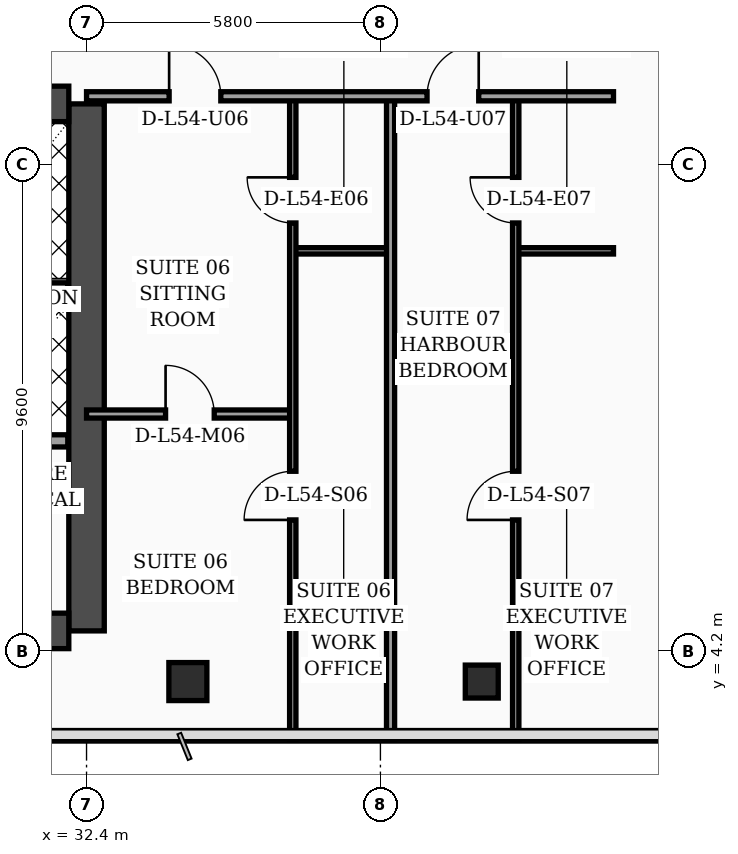
"""IFC4 building model, lengths in metres.
Left out: names, types, materials, properties, quantities, classifications, styles, units other than length and angle.
Written with IfcOpenShell. Run it as: python <this file> out.ifc"""

import sys

from ifc_helpers import new_model, si_unit, direction, frame, frame_2d, origin, origin_2d, place, context, subcontext, project, spatial, rectangle, hollow_rectangle, extrude, element, fill, save


model = new_model("IFC4")
c1 = context("Model", 3, precision=1e-05, world=origin(), true_north=direction((0.0, 1.0)))
c2 = subcontext(c1, "Body", "Model", "MODEL_VIEW")
j1 = project(units=[si_unit("LENGTHUNIT", "METRE"), si_unit("PLANEANGLEUNIT", "RADIAN")], contexts=[c1])
p1 = place(None, origin())
s1 = spatial("IfcSite", under=j1, at=p1, CompositionType="ELEMENT")
p2 = place(p1, origin())
s2 = spatial("IfcBuilding", under=s1, at=p2, CompositionType="ELEMENT")
p3 = place(p2, frame((0.0, 0.0, 219.3)))
s3 = spatial("IfcBuildingStorey", under=s2, at=p3, CompositionType="ELEMENT", Elevation=219.3)
p4 = place(p3, frame((32.4, 4.6, 0.0), z_axis=(0.0, 0.0, 1.0), x_axis=(0.0, 1.0, 0.0)))
e1 = element("IfcWall", 1, at=p4, inside=s3, PredefinedType="SHEAR", context=c2, shape_type="SweptSolid", body=[
    extrude(rectangle(XDim=10.4, YDim=0.7, at=frame_2d((5.2, 0.0))), origin(), (0.0, 0.0, 1.0), 3.56),
])
p5 = place(p3, frame((21.95, 15.0, 0.0), z_axis=(0.0, 0.0, 1.0), x_axis=(1.0, 0.0, 0.0)))
e2 = element("IfcWall", 2, at=p5, inside=s3, PredefinedType="SHEAR", context=c2, shape_type="SweptSolid", body=[
    extrude(rectangle(XDim=10.1, YDim=0.7, at=frame_2d((5.05, 0.0))), origin(), (0.0, 0.0, 1.0), 3.56),
])
p6 = place(p5, frame((4.95, 0.0, 0.0)))
e3 = element("IfcOpeningElement", 3, at=p6, cuts=e2, PredefinedType="OPENING", context=c2, shape_type="SweptSolid", body=[
    extrude(rectangle(XDim=1.1, YDim=2.2, at=frame_2d((0.55, 1.1))), frame((0.0, 0.36, 0.0), z_axis=(0.0, -1.0, 0.0), x_axis=(1.0, 0.0, 0.0)), (0.0, 0.0, 1.0), 0.72),
])
p7 = place(p3, frame((21.95, 4.6, 0.0), z_axis=(0.0, 0.0, 1.0), x_axis=(1.0, 0.0, 0.0)))
e4 = element("IfcWall", 4, at=p7, inside=s3, PredefinedType="SHEAR", context=c2, shape_type="SweptSolid", body=[
    extrude(rectangle(XDim=10.1, YDim=0.7, at=frame_2d((5.05, 0.0))), origin(), (0.0, 0.0, 1.0), 3.56),
])
p8 = place(p3, frame((34.4, 3.6, 0.0), z_axis=(0.0, 0.0, 1.0), x_axis=(1.0, 0.0, 0.0)))
e5 = element("IfcColumn", 5, at=p8, inside=s3, PredefinedType="COLUMN", context=c2, shape_type="SweptSolid", body=[
    extrude(hollow_rectangle(XDim=0.75, YDim=0.75, WallThickness=0.032, at=origin_2d()), origin(), (0.0, 0.0, 1.0), 3.56),
])
p9 = place(p3, frame((40.2, 3.6, 0.0), z_axis=(0.0, 0.0, 1.0), x_axis=(1.0, 0.0, 0.0)))
e6 = element("IfcColumn", 6, at=p9, inside=s3, PredefinedType="COLUMN", context=c2, shape_type="SweptSolid", body=[
    extrude(hollow_rectangle(XDim=0.65, YDim=0.65, WallThickness=0.028, at=origin_2d()), origin(), (0.0, 0.0, 1.0), 3.56),
])
p10 = place(p3, frame((49.43, 5.505, 0.0), z_axis=(0.0, 0.0, 1.0), x_axis=(-0.300509063924, 0.953778958931, 0.0)))
e7 = element("IfcWall", 7, at=p10, inside=s3, PredefinedType="SOLIDWALL", context=c2, shape_type="SweptSolid", body=[
    extrude(rectangle(XDim=30.814, YDim=0.32, at=frame_2d((15.407, 0.0))), origin(), (0.0, 0.0, 1.0), 3.56),
])
p11 = place(p10, frame((8.9, 0.0, 0.0)))
e8 = element("IfcOpeningElement", 8, at=p11, cuts=e7, PredefinedType="OPENING", context=c2, shape_type="SweptSolid", body=[
    extrude(rectangle(XDim=1.4, YDim=2.25, at=frame_2d((0.7, 1.125))), frame((0.0, 0.17, 0.0), z_axis=(0.0, -1.0, 0.0), x_axis=(1.0, 0.0, 0.0)), (0.0, 0.0, 1.0), 0.34),
])
p12 = place(p10, frame((4.437, 0.0, 0.7)))
e9 = element("IfcOpeningElement", 9, at=p12, cuts=e7, PredefinedType="OPENING", context=c2, shape_type="SweptSolid", body=[
    extrude(rectangle(XDim=1.6, YDim=1.65, at=frame_2d((0.8, 0.825))), frame((0.0, 0.17, 0.0), z_axis=(0.0, -1.0, 0.0), x_axis=(1.0, 0.0, 0.0)), (0.0, 0.0, 1.0), 0.34),
])
p13 = place(p10, frame((18.696, 0.0, 0.7)))
e10 = element("IfcOpeningElement", 10, at=p13, cuts=e7, PredefinedType="OPENING", context=c2, shape_type="SweptSolid", body=[
    extrude(rectangle(XDim=1.6, YDim=1.65, at=frame_2d((0.8, 0.825))), frame((0.0, 0.17, 0.0), z_axis=(0.0, -1.0, 0.0), x_axis=(1.0, 0.0, 0.0)), (0.0, 0.0, 1.0), 0.34),
])
p14 = place(p10, frame((1.6, 0.0, 0.75)))
e11 = element("IfcOpeningElement", 11, at=p14, cuts=e7, PredefinedType="OPENING", context=c2, shape_type="SweptSolid", body=[
    extrude(rectangle(XDim=1.5, YDim=1.6, at=frame_2d((0.75, 0.8))), frame((0.0, 0.17, 0.0), z_axis=(0.0, -1.0, 0.0), x_axis=(1.0, 0.0, 0.0)), (0.0, 0.0, 1.0), 0.34),
])
p15 = place(p10, frame((6.75, 0.0, 0.75)))
e12 = element("IfcOpeningElement", 12, at=p15, cuts=e7, PredefinedType="OPENING", context=c2, shape_type="SweptSolid", body=[
    extrude(rectangle(XDim=1.5, YDim=1.6, at=frame_2d((0.75, 0.8))), frame((0.0, 0.17, 0.0), z_axis=(0.0, -1.0, 0.0), x_axis=(1.0, 0.0, 0.0)), (0.0, 0.0, 1.0), 0.34),
])
p16 = place(p10, frame((10.9, 0.0, 0.75)))
e13 = element("IfcOpeningElement", 13, at=p16, cuts=e7, PredefinedType="OPENING", context=c2, shape_type="SweptSolid", body=[
    extrude(rectangle(XDim=1.5, YDim=1.6, at=frame_2d((0.75, 0.8))), frame((0.0, 0.17, 0.0), z_axis=(0.0, -1.0, 0.0), x_axis=(1.0, 0.0, 0.0)), (0.0, 0.0, 1.0), 0.34),
])
p17 = place(p10, frame((14.0, 0.0, 0.75)))
e14 = element("IfcOpeningElement", 14, at=p17, cuts=e7, PredefinedType="OPENING", context=c2, shape_type="SweptSolid", body=[
    extrude(rectangle(XDim=1.5, YDim=1.6, at=frame_2d((0.75, 0.8))), frame((0.0, 0.17, 0.0), z_axis=(0.0, -1.0, 0.0), x_axis=(1.0, 0.0, 0.0)), (0.0, 0.0, 1.0), 0.34),
])
p18 = place(p10, frame((16.55, 0.0, 0.75)))
e15 = element("IfcOpeningElement", 15, at=p18, cuts=e7, PredefinedType="OPENING", context=c2, shape_type="SweptSolid", body=[
    extrude(rectangle(XDim=1.5, YDim=1.6, at=frame_2d((0.75, 0.8))), frame((0.0, 0.17, 0.0), z_axis=(0.0, -1.0, 0.0), x_axis=(1.0, 0.0, 0.0)), (0.0, 0.0, 1.0), 0.34),
])
p19 = place(p10, frame((20.75, 0.0, 0.75)))
e16 = element("IfcOpeningElement", 16, at=p19, cuts=e7, PredefinedType="OPENING", context=c2, shape_type="SweptSolid", body=[
    extrude(rectangle(XDim=1.5, YDim=1.6, at=frame_2d((0.75, 0.8))), frame((0.0, 0.17, 0.0), z_axis=(0.0, -1.0, 0.0), x_axis=(1.0, 0.0, 0.0)), (0.0, 0.0, 1.0), 0.34),
])
p20 = place(p10, frame((23.3, 0.0, 0.75)))
e17 = element("IfcOpeningElement", 17, at=p20, cuts=e7, PredefinedType="OPENING", context=c2, shape_type="SweptSolid", body=[
    extrude(rectangle(XDim=1.5, YDim=1.6, at=frame_2d((0.75, 0.8))), frame((0.0, 0.17, 0.0), z_axis=(0.0, -1.0, 0.0), x_axis=(1.0, 0.0, 0.0)), (0.0, 0.0, 1.0), 0.34),
])
p21 = place(p10, frame((26.4, 0.0, 0.75)))
e18 = element("IfcOpeningElement", 18, at=p21, cuts=e7, PredefinedType="OPENING", context=c2, shape_type="SweptSolid", body=[
    extrude(rectangle(XDim=1.5, YDim=1.6, at=frame_2d((0.75, 0.8))), frame((0.0, 0.17, 0.0), z_axis=(0.0, -1.0, 0.0), x_axis=(1.0, 0.0, 0.0)), (0.0, 0.0, 1.0), 0.34),
])
p22 = place(p3, frame((27.02, 11.35, 0.0), z_axis=(0.0, 0.0, 1.0), x_axis=(1.0, 0.0, 0.0)))
e19 = element("IfcWall", 19, at=p22, inside=s3, PredefinedType="SOLIDWALL", context=c2, shape_type="SweptSolid", body=[
    extrude(rectangle(XDim=5.01, YDim=0.24, at=frame_2d((2.505, 0.0))), origin(), (0.0, 0.0, 1.0), 3.56),
])
p23 = place(p22, frame((0.45, 0.0, 0.0)))
e20 = element("IfcOpeningElement", 20, at=p23, cuts=e19, PredefinedType="OPENING", context=c2, shape_type="SweptSolid", body=[
    extrude(rectangle(XDim=1.3, YDim=2.35, at=frame_2d((0.65, 1.175))), frame((0.0, 0.13, 0.0), z_axis=(0.0, -1.0, 0.0), x_axis=(1.0, 0.0, 0.0)), (0.0, 0.0, 1.0), 0.26),
])
p24 = place(p3, frame((27.02, 8.35, 0.0), z_axis=(0.0, 0.0, 1.0), x_axis=(1.0, 0.0, 0.0)))
e21 = element("IfcWall", 21, at=p24, inside=s3, PredefinedType="SOLIDWALL", context=c2, shape_type="SweptSolid", body=[
    extrude(rectangle(XDim=5.01, YDim=0.24, at=frame_2d((2.505, 0.0))), origin(), (0.0, 0.0, 1.0), 3.56),
])
p25 = place(p3, frame((36.47, 12.1, 0.0), z_axis=(0.0, 0.0, 1.0), x_axis=(1.0, 0.0, 0.0)))
e22 = element("IfcWall", 22, at=p25, inside=s3, PredefinedType="PARTITIONING", context=c2, shape_type="SweptSolid", body=[
    extrude(rectangle(XDim=1.93, YDim=0.125, at=frame_2d((0.965, 0.0))), origin(), (0.0, 0.0, 1.0), 3.56),
])
p26 = place(p3, frame((32.4, 8.88, 0.0), z_axis=(0.0, 0.0, 1.0), x_axis=(1.0, 0.0, 0.0)))
e23 = element("IfcWall", 23, at=p26, inside=s3, PredefinedType="PARTITIONING", context=c2, shape_type="SweptSolid", body=[
    extrude(rectangle(XDim=4.07, YDim=0.16, at=frame_2d((2.035, 0.0))), origin(), (0.0, 0.0, 1.0), 2.94),
])
p27 = place(p26, frame((1.56, 0.0, 0.0)))
e24 = element("IfcOpeningElement", 24, at=p27, cuts=e23, PredefinedType="OPENING", context=c2, shape_type="SweptSolid", body=[
    extrude(rectangle(XDim=0.96, YDim=2.2, at=frame_2d((0.48, 1.1))), frame((0.0, 0.09, 0.0), z_axis=(0.0, -1.0, 0.0), x_axis=(1.0, 0.0, 0.0)), (0.0, 0.0, 1.0), 0.18),
])
p28 = place(p3, frame((36.47, 2.44, 0.0), z_axis=(0.0, 0.0, 1.0), x_axis=(0.0, 1.0, 0.0)))
e25 = element("IfcWall", 25, at=p28, inside=s3, PredefinedType="PARTITIONING", context=c2, shape_type="SweptSolid", body=[
    extrude(rectangle(XDim=12.71, YDim=0.125, at=frame_2d((6.355, 0.0))), origin(), (0.0, 0.0, 1.0), 2.94),
])
p29 = place(p28, frame((4.35, 0.0, 0.0)))
e26 = element("IfcOpeningElement", 26, at=p29, cuts=e25, PredefinedType="OPENING", context=c2, shape_type="SweptSolid", body=[
    extrude(rectangle(XDim=0.96, YDim=2.2, at=frame_2d((0.48, 1.1))), frame((0.0, 0.073, 0.0), z_axis=(0.0, -1.0, 0.0), x_axis=(1.0, 0.0, 0.0)), (0.0, 0.0, 1.0), 0.145),
])
p30 = place(p28, frame((10.21, 0.0, 0.0)))
e27 = element("IfcOpeningElement", 27, at=p30, cuts=e25, PredefinedType="OPENING", context=c2, shape_type="SweptSolid", body=[
    extrude(rectangle(XDim=0.9, YDim=2.15, at=frame_2d((0.45, 1.075))), frame((0.0, 0.073, 0.0), z_axis=(0.0, -1.0, 0.0), x_axis=(1.0, 0.0, 0.0)), (0.0, 0.0, 1.0), 0.145),
])
p31 = place(p3, frame((40.87, 12.1, 0.0), z_axis=(0.0, 0.0, 1.0), x_axis=(1.0, 0.0, 0.0)))
e28 = element("IfcWall", 28, at=p31, inside=s3, PredefinedType="PARTITIONING", context=c2, shape_type="SweptSolid", body=[
    extrude(rectangle(XDim=1.93, YDim=0.125, at=frame_2d((0.965, 0.0))), origin(), (0.0, 0.0, 1.0), 3.56),
])
p32 = place(p3, frame((40.87, 2.44, 0.0), z_axis=(0.0, 0.0, 1.0), x_axis=(0.0, 1.0, 0.0)))
e29 = element("IfcWall", 29, at=p32, inside=s3, PredefinedType="PARTITIONING", context=c2, shape_type="SweptSolid", body=[
    extrude(rectangle(XDim=12.71, YDim=0.125, at=frame_2d((6.355, 0.0))), origin(), (0.0, 0.0, 1.0), 2.94),
])
p33 = place(p32, frame((4.35, 0.0, 0.0)))
e30 = element("IfcOpeningElement", 30, at=p33, cuts=e29, PredefinedType="OPENING", context=c2, shape_type="SweptSolid", body=[
    extrude(rectangle(XDim=0.96, YDim=2.2, at=frame_2d((0.48, 1.1))), frame((0.0, 0.073, 0.0), z_axis=(0.0, -1.0, 0.0), x_axis=(1.0, 0.0, 0.0)), (0.0, 0.0, 1.0), 0.145),
])
p34 = place(p32, frame((10.21, 0.0, 0.0)))
e31 = element("IfcOpeningElement", 31, at=p34, cuts=e29, PredefinedType="OPENING", context=c2, shape_type="SweptSolid", body=[
    extrude(rectangle(XDim=0.9, YDim=2.15, at=frame_2d((0.45, 1.075))), frame((0.0, 0.073, 0.0), z_axis=(0.0, -1.0, 0.0), x_axis=(1.0, 0.0, 0.0)), (0.0, 0.0, 1.0), 0.145),
])
p35 = place(p3, frame((38.4, 2.44, 0.0), z_axis=(0.0, 0.0, 1.0), x_axis=(0.0, 1.0, 0.0)))
e32 = element("IfcWall", 32, at=p35, inside=s3, PredefinedType="PARTITIONING", context=c2, shape_type="SweptSolid", body=[
    extrude(rectangle(XDim=12.71, YDim=0.16, at=frame_2d((6.355, 0.0))), origin(), (0.0, 0.0, 1.0), 2.94),
])
p36 = place(p3, frame((32.4, 15.15, 0.0), z_axis=(0.0, 0.0, 1.0), x_axis=(1.0, 0.0, 0.0)))
e33 = element("IfcWall", 33, at=p36, inside=s3, PredefinedType="PARTITIONING", context=c2, shape_type="SweptSolid", body=[
    extrude(rectangle(XDim=10.4, YDim=0.18, at=frame_2d((5.2, 0.0))), origin(), (0.0, 0.0, 1.0), 2.94),
])
p37 = place(p36, frame((1.63, 0.0, 0.0)))
e34 = element("IfcOpeningElement", 34, at=p37, cuts=e33, PredefinedType="OPENING", context=c2, shape_type="SweptSolid", body=[
    extrude(rectangle(XDim=1.02, YDim=2.2, at=frame_2d((0.51, 1.1))), frame((0.0, 0.1, 0.0), z_axis=(0.0, -1.0, 0.0), x_axis=(1.0, 0.0, 0.0)), (0.0, 0.0, 1.0), 0.2),
])
p38 = place(p36, frame((6.72, 0.0, 0.0)))
e35 = element("IfcOpeningElement", 35, at=p38, cuts=e33, PredefinedType="OPENING", context=c2, shape_type="SweptSolid", body=[
    extrude(rectangle(XDim=1.02, YDim=2.2, at=frame_2d((0.51, 1.1))), frame((0.0, 0.1, 0.0), z_axis=(0.0, -1.0, 0.0), x_axis=(1.0, 0.0, 0.0)), (0.0, 0.0, 1.0), 0.2),
])
p39 = place(p27, origin())
e36 = element("IfcDoor", 36, at=p39, inside=s3, OperationType="SINGLE_SWING_LEFT", PredefinedType="DOOR", context=c2, shape_type="SweptSolid", body=[
    extrude(rectangle(XDim=0.96, YDim=2.2, at=frame_2d((0.48, 1.1))), frame((0.0, 0.025, 0.0), z_axis=(0.0, -1.0, 0.0), x_axis=(1.0, 0.0, 0.0)), (0.0, 0.0, 1.0), 0.05),
])
fill(e24, e36)
p40 = place(p29, origin())
e37 = element("IfcDoor", 37, at=p40, inside=s3, OperationType="SINGLE_SWING_LEFT", PredefinedType="DOOR", context=c2, shape_type="SweptSolid", body=[
    extrude(rectangle(XDim=0.96, YDim=2.2, at=frame_2d((0.48, 1.1))), frame((0.0, 0.025, 0.0), z_axis=(0.0, -1.0, 0.0), x_axis=(1.0, 0.0, 0.0)), (0.0, 0.0, 1.0), 0.05),
])
fill(e26, e37)
p41 = place(p30, origin())
e38 = element("IfcDoor", 38, at=p41, inside=s3, OperationType="SINGLE_SWING_RIGHT", PredefinedType="DOOR", context=c2, shape_type="SweptSolid", body=[
    extrude(rectangle(XDim=0.9, YDim=2.15, at=frame_2d((0.45, 1.075))), frame((0.0, 0.025, 0.0), z_axis=(0.0, -1.0, 0.0), x_axis=(1.0, 0.0, 0.0)), (0.0, 0.0, 1.0), 0.05),
])
fill(e27, e38)
p42 = place(p33, origin())
e39 = element("IfcDoor", 39, at=p42, inside=s3, OperationType="SINGLE_SWING_LEFT", PredefinedType="DOOR", context=c2, shape_type="SweptSolid", body=[
    extrude(rectangle(XDim=0.96, YDim=2.2, at=frame_2d((0.48, 1.1))), frame((0.0, 0.025, 0.0), z_axis=(0.0, -1.0, 0.0), x_axis=(1.0, 0.0, 0.0)), (0.0, 0.0, 1.0), 0.05),
])
fill(e30, e39)
p43 = place(p34, origin())
e40 = element("IfcDoor", 40, at=p43, inside=s3, OperationType="SINGLE_SWING_RIGHT", PredefinedType="DOOR", context=c2, shape_type="SweptSolid", body=[
    extrude(rectangle(XDim=0.9, YDim=2.15, at=frame_2d((0.45, 1.075))), frame((0.0, 0.025, 0.0), z_axis=(0.0, -1.0, 0.0), x_axis=(1.0, 0.0, 0.0)), (0.0, 0.0, 1.0), 0.05),
])
fill(e31, e40)
p44 = place(p37, origin())
e41 = element("IfcDoor", 41, at=p44, inside=s3, OperationType="SINGLE_SWING_LEFT", PredefinedType="DOOR", context=c2, shape_type="SweptSolid", body=[
    extrude(rectangle(XDim=1.02, YDim=2.2, at=frame_2d((0.51, 1.1))), frame((0.0, 0.025, 0.0), z_axis=(0.0, -1.0, 0.0), x_axis=(1.0, 0.0, 0.0)), (0.0, 0.0, 1.0), 0.05),
])
fill(e34, e41)
p45 = place(p38, origin())
e42 = element("IfcDoor", 42, at=p45, inside=s3, OperationType="SINGLE_SWING_RIGHT", PredefinedType="DOOR", context=c2, shape_type="SweptSolid", body=[
    extrude(rectangle(XDim=1.02, YDim=2.2, at=frame_2d((0.51, 1.1))), frame((0.0, 0.025, 0.0), z_axis=(0.0, -1.0, 0.0), x_axis=(1.0, 0.0, 0.0)), (0.0, 0.0, 1.0), 0.05),
])
fill(e35, e42)
save(model, sys.argv[1])
